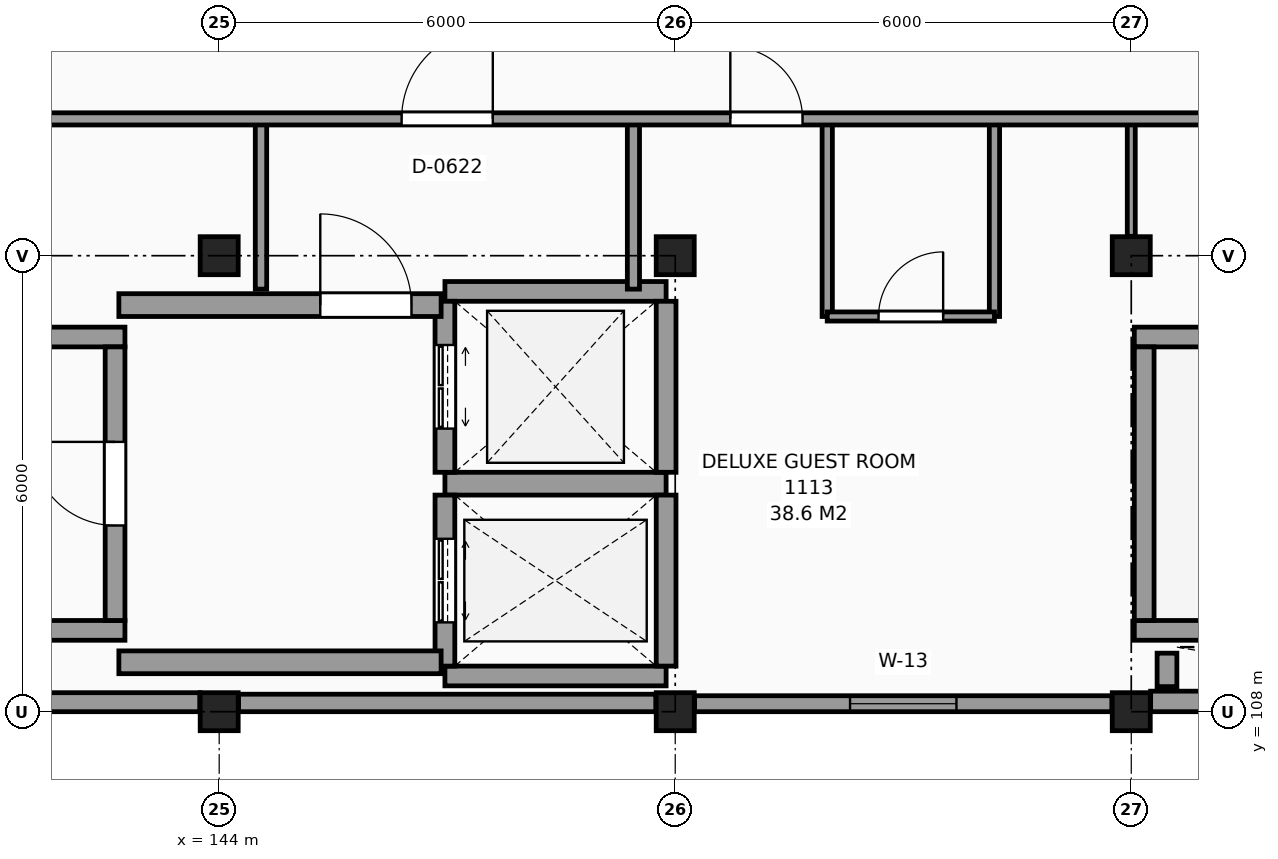
"""IFC4 building model, lengths in metres.
Left out: names, types, materials, properties, quantities, classifications, styles, units other than length and angle.
Written with IfcOpenShell. Run it as: python <this file> out.ifc"""

import sys

from ifc_helpers import new_model, si_unit, direction, frame, frame_2d, origin, origin_2d, place, context, subcontext, project, spatial, rectangle, extrude, element, fill, save


model = new_model("IFC4")
c1 = context("Model", 3, precision=1e-05, world=origin(), true_north=direction((0.0, 1.0)))
c2 = subcontext(c1, "Body", "Model", "MODEL_VIEW")
j1 = project(units=[si_unit("LENGTHUNIT", "METRE"), si_unit("PLANEANGLEUNIT", "RADIAN")], contexts=[c1])
p1 = place(None, origin())
s1 = spatial("IfcSite", under=j1, at=p1, CompositionType="ELEMENT")
p2 = place(p1, origin())
s2 = spatial("IfcBuilding", under=s1, at=p2, CompositionType="ELEMENT")
p3 = place(p2, frame((0.0, 0.0, 44.7)))
s3 = spatial("IfcBuildingStorey", under=s2, at=p3, CompositionType="ELEMENT", Elevation=44.7)
for number, where, z_axis, x_axis in (
    (1, (144.0, 108.0, 0.0), (0.0, 0.0, 1.0), (1.0, 0.0, 0.0)),
    (2, (144.0, 114.0, 0.0), (0.0, 0.0, 1.0), (1.0, 0.0, 0.0)),
    (3, (150.0, 108.0, 0.0), (0.0, 0.0, 1.0), (1.0, 0.0, 0.0)),
    (4, (150.0, 114.0, 0.0), (0.0, 0.0, 1.0), (1.0, 0.0, 0.0)),
    (5, (156.0, 108.0, 0.0), (0.0, 0.0, 1.0), (1.0, 0.0, 0.0)),
    (6, (156.0, 114.0, 0.0), (0.0, 0.0, 1.0), (1.0, 0.0, 0.0)),
):
    element("IfcColumn", number, at=place(p3, frame(where, z_axis=z_axis, x_axis=x_axis)), inside=s3, PredefinedType="COLUMN", context=c2, shape_type="SweptSolid", body=[
        extrude(rectangle(XDim=0.5, YDim=0.5, at=origin_2d()), origin(), (0.0, 0.0, 1.0), 3.3),
    ])
p4 = place(p3, frame((138.255, 108.125, 0.0), z_axis=(0.0, 0.0, 1.0), x_axis=(1.0, 0.0, 0.0)))
e7 = element("IfcWall", 7, at=p4, inside=s3, PredefinedType="SOLIDWALL", context=c2, shape_type="SweptSolid", body=[
    extrude(rectangle(XDim=5.49, YDim=0.25, at=frame_2d((2.745, 0.0))), origin(), (0.0, 0.0, 1.0), 2.4),
])
p5 = place(p3, frame((144.255, 108.115, 0.0), z_axis=(0.0, 0.0, 1.0), x_axis=(1.0, 0.0, 0.0)))
e8 = element("IfcWall", 8, at=p5, inside=s3, PredefinedType="SOLIDWALL", context=c2, shape_type="SweptSolid", body=[
    extrude(rectangle(XDim=5.49, YDim=0.23, at=frame_2d((2.745, 0.0))), origin(), (0.0, 0.0, 1.0), 2.4),
])
p6 = place(p3, frame((150.255, 108.105, 0.0), z_axis=(0.0, 0.0, 1.0), x_axis=(1.0, 0.0, 0.0)))
e9 = element("IfcWall", 9, at=p6, inside=s3, PredefinedType="SOLIDWALL", context=c2, shape_type="SweptSolid", body=[
    extrude(rectangle(XDim=5.49, YDim=0.21, at=frame_2d((2.745, 0.0))), origin(), (0.0, 0.0, 1.0), 2.4),
])
p7 = place(p6, frame((2.045, 0.0, 0.8)))
e10 = element("IfcOpeningElement", 10, at=p7, cuts=e9, PredefinedType="OPENING", context=c2, shape_type="SweptSolid", body=[
    extrude(rectangle(XDim=1.4, YDim=1.4, at=frame_2d((0.7, 0.7))), frame((0.0, 0.115, 0.0), z_axis=(0.0, -1.0, 0.0), x_axis=(1.0, 0.0, 0.0)), (0.0, 0.0, 1.0), 0.23),
])
p8 = place(p3, frame((156.255, 108.135, 0.0), z_axis=(0.0, 0.0, 1.0), x_axis=(1.0, 0.0, 0.0)))
e11 = element("IfcWall", 11, at=p8, inside=s3, PredefinedType="SOLIDWALL", context=c2, shape_type="SweptSolid", body=[
    extrude(rectangle(XDim=5.49, YDim=0.27, at=frame_2d((2.745, 0.0))), origin(), (0.0, 0.0, 1.0), 3.05),
])
for number, where, z_axis, x_axis in (
    (12, (156.04, 109.07, 0.0), (0.0, 0.0, 1.0), (1.0, 0.0, 0.0)),
    (13, (156.04, 112.93, 0.0), (0.0, 0.0, 1.0), (1.0, 0.0, 0.0)),
):
    element("IfcWall", number, at=place(p3, frame(where, z_axis=z_axis, x_axis=x_axis)), inside=s3, PredefinedType="SHEAR", context=c2, shape_type="SweptSolid", body=[
        extrude(rectangle(XDim=10.72, YDim=0.26, at=frame_2d((5.36, 0.0))), origin(), (0.0, 0.0, 1.0), 3.3),
    ])
p9 = place(p3, frame((156.17, 109.2, 0.0), z_axis=(0.0, 0.0, 1.0), x_axis=(0.0, 1.0, 0.0)))
e14 = element("IfcWall", 14, at=p9, inside=s3, PredefinedType="SHEAR", context=c2, shape_type="SweptSolid", body=[
    extrude(rectangle(XDim=3.6, YDim=0.26, at=frame_2d((1.8, 0.0))), origin(), (0.0, 0.0, 1.0), 3.3),
])
p10 = place(p3, frame((156.47, 108.33, 0.0), z_axis=(0.0, 0.0, 1.0), x_axis=(0.0, 1.0, 0.0)))
e15 = element("IfcWall", 15, at=p10, inside=s3, PredefinedType="SHEAR", context=c2, shape_type="SweptSolid", body=[
    extrude(rectangle(XDim=0.44, YDim=0.26, at=frame_2d((0.22, 0.0))), origin(), (0.0, 0.0, 1.0), 3.3),
])
for number, where, z_axis, x_axis in (
    (16, (132.04, 109.07, 0.0), (0.0, 0.0, 1.0), (1.0, 0.0, 0.0)),
    (17, (132.04, 112.93, 0.0), (0.0, 0.0, 1.0), (1.0, 0.0, 0.0)),
):
    element("IfcWall", number, at=place(p3, frame(where, z_axis=z_axis, x_axis=x_axis)), inside=s3, PredefinedType="SHEAR", context=c2, shape_type="SweptSolid", body=[
        extrude(rectangle(XDim=10.72, YDim=0.26, at=frame_2d((5.36, 0.0))), origin(), (0.0, 0.0, 1.0), 3.3),
    ])
p11 = place(p3, frame((142.63, 109.2, 0.0), z_axis=(0.0, 0.0, 1.0), x_axis=(0.0, 1.0, 0.0)))
e18 = element("IfcWall", 18, at=p11, inside=s3, PredefinedType="SHEAR", context=c2, shape_type="SweptSolid", body=[
    extrude(rectangle(XDim=3.6, YDim=0.26, at=frame_2d((1.8, 0.0))), origin(), (0.0, 0.0, 1.0), 3.3),
])
p12 = place(p11, frame((1.25, 0.0, 0.0)))
e19 = element("IfcOpeningElement", 19, at=p12, cuts=e18, PredefinedType="OPENING", context=c2, shape_type="SweptSolid", body=[
    extrude(rectangle(XDim=1.1, YDim=2.15, at=frame_2d((0.55, 1.075))), frame((0.0, 0.14, 0.0), z_axis=(0.0, -1.0, 0.0), x_axis=(1.0, 0.0, 0.0)), (0.0, 0.0, 1.0), 0.28),
])
p13 = place(p3, frame((146.97, 108.47, 0.0), z_axis=(0.0, 0.0, 1.0), x_axis=(1.0, 0.0, 0.0)))
e20 = element("IfcWall", 20, at=p13, inside=s3, PredefinedType="SHEAR", context=c2, shape_type="SweptSolid", body=[
    extrude(rectangle(XDim=2.91, YDim=0.26, at=frame_2d((1.455, 0.0))), origin(), (0.0, 0.0, 1.0), 3.3),
])
p14 = place(p3, frame((146.97, 111.0, 0.0), z_axis=(0.0, 0.0, 1.0), x_axis=(1.0, 0.0, 0.0)))
e21 = element("IfcWall", 21, at=p14, inside=s3, PredefinedType="SHEAR", context=c2, shape_type="SweptSolid", body=[
    extrude(rectangle(XDim=2.91, YDim=0.3, at=frame_2d((1.455, 0.0))), origin(), (0.0, 0.0, 1.0), 3.3),
])
p15 = place(p3, frame((149.88, 108.6, 0.0), z_axis=(0.0, 0.0, 1.0), x_axis=(0.0, 1.0, 0.0)))
e22 = element("IfcWall", 22, at=p15, inside=s3, PredefinedType="SHEAR", context=c2, shape_type="SweptSolid", body=[
    extrude(rectangle(XDim=2.25, YDim=0.26, at=frame_2d((1.125, 0.0))), origin(), (0.0, 0.0, 1.0), 3.3),
])
p16 = place(p3, frame((146.97, 108.6, 0.0), z_axis=(0.0, 0.0, 1.0), x_axis=(0.0, 1.0, 0.0)))
e23 = element("IfcWall", 23, at=p16, inside=s3, PredefinedType="SHEAR", context=c2, shape_type="SweptSolid", body=[
    extrude(rectangle(XDim=2.25, YDim=0.26, at=frame_2d((1.125, 0.0))), origin(), (0.0, 0.0, 1.0), 3.3),
])
p17 = place(p16, frame((0.575, 0.0, 0.0)))
e24 = element("IfcOpeningElement", 24, at=p17, cuts=e23, PredefinedType="OPENING", context=c2, shape_type="SweptSolid", body=[
    extrude(rectangle(XDim=1.1, YDim=2.2, at=frame_2d((0.55, 1.1))), frame((0.0, 0.14, 0.0), z_axis=(0.0, -1.0, 0.0), x_axis=(1.0, 0.0, 0.0)), (0.0, 0.0, 1.0), 0.28),
])
p18 = place(p3, frame((146.97, 113.53, 0.0), z_axis=(0.0, 0.0, 1.0), x_axis=(1.0, 0.0, 0.0)))
e25 = element("IfcWall", 25, at=p18, inside=s3, PredefinedType="SHEAR", context=c2, shape_type="SweptSolid", body=[
    extrude(rectangle(XDim=2.91, YDim=0.26, at=frame_2d((1.455, 0.0))), origin(), (0.0, 0.0, 1.0), 3.3),
])
p19 = place(p3, frame((149.88, 111.15, 0.0), z_axis=(0.0, 0.0, 1.0), x_axis=(0.0, 1.0, 0.0)))
e26 = element("IfcWall", 26, at=p19, inside=s3, PredefinedType="SHEAR", context=c2, shape_type="SweptSolid", body=[
    extrude(rectangle(XDim=2.25, YDim=0.26, at=frame_2d((1.125, 0.0))), origin(), (0.0, 0.0, 1.0), 3.3),
])
p20 = place(p3, frame((146.97, 111.15, 0.0), z_axis=(0.0, 0.0, 1.0), x_axis=(0.0, 1.0, 0.0)))
e27 = element("IfcWall", 27, at=p20, inside=s3, PredefinedType="SHEAR", context=c2, shape_type="SweptSolid", body=[
    extrude(rectangle(XDim=2.25, YDim=0.26, at=frame_2d((1.125, 0.0))), origin(), (0.0, 0.0, 1.0), 3.3),
])
p21 = place(p20, frame((0.575, 0.0, 0.0)))
e28 = element("IfcOpeningElement", 28, at=p21, cuts=e27, PredefinedType="OPENING", context=c2, shape_type="SweptSolid", body=[
    extrude(rectangle(XDim=1.1, YDim=2.2, at=frame_2d((0.55, 1.1))), frame((0.0, 0.14, 0.0), z_axis=(0.0, -1.0, 0.0), x_axis=(1.0, 0.0, 0.0)), (0.0, 0.0, 1.0), 0.28),
])
p22 = place(p3, frame((142.68, 113.35, 0.0), z_axis=(0.0, 0.0, 1.0), x_axis=(1.0, 0.0, 0.0)))
e29 = element("IfcWall", 29, at=p22, inside=s3, PredefinedType="SHEAR", context=c2, shape_type="SweptSolid", body=[
    extrude(rectangle(XDim=4.24, YDim=0.3, at=frame_2d((2.12, 0.0))), origin(), (0.0, 0.0, 1.0), 3.3),
])
p23 = place(p22, frame((2.65, 0.0, 0.0)))
e30 = element("IfcOpeningElement", 30, at=p23, cuts=e29, PredefinedType="OPENING", context=c2, shape_type="SweptSolid", body=[
    extrude(rectangle(XDim=1.2, YDim=2.2, at=frame_2d((0.6, 1.1))), frame((0.0, 0.16, 0.0), z_axis=(0.0, -1.0, 0.0), x_axis=(1.0, 0.0, 0.0)), (0.0, 0.0, 1.0), 0.32),
])
p24 = place(p3, frame((142.68, 108.65, 0.0), z_axis=(0.0, 0.0, 1.0), x_axis=(1.0, 0.0, 0.0)))
e31 = element("IfcWall", 31, at=p24, inside=s3, PredefinedType="SHEAR", context=c2, shape_type="SweptSolid", body=[
    extrude(rectangle(XDim=4.24, YDim=0.3, at=frame_2d((2.12, 0.0))), origin(), (0.0, 0.0, 1.0), 3.3),
])
p25 = place(p3, frame((144.55, 113.56, 0.0), z_axis=(0.0, 0.0, 1.0), x_axis=(0.0, 1.0, 0.0)))
e32 = element("IfcWall", 32, at=p25, inside=s3, PredefinedType="PARTITIONING", context=c2, shape_type="SweptSolid", body=[
    extrude(rectangle(XDim=2.24, YDim=0.15, at=frame_2d((1.12, 0.0))), origin(), (0.0, 0.0, 1.0), 3.05),
])
p26 = place(p3, frame((149.45, 113.56, 0.0), z_axis=(0.0, 0.0, 1.0), x_axis=(0.0, 1.0, 0.0)))
e33 = element("IfcWall", 33, at=p26, inside=s3, PredefinedType="PARTITIONING", context=c2, shape_type="SweptSolid", body=[
    extrude(rectangle(XDim=2.24, YDim=0.16, at=frame_2d((1.12, 0.0))), origin(), (0.0, 0.0, 1.0), 3.05),
])
for number, where, z_axis, x_axis in (
    (34, (152.0, 113.2, 0.0), (0.0, 0.0, 1.0), (0.0, 1.0, 0.0)),
    (35, (154.2, 113.2, 0.0), (0.0, 0.0, 1.0), (0.0, 1.0, 0.0)),
):
    element("IfcWall", number, at=place(p3, frame(where, z_axis=z_axis, x_axis=x_axis)), inside=s3, PredefinedType="PARTITIONING", context=c2, shape_type="SweptSolid", body=[
        extrude(rectangle(XDim=2.6, YDim=0.135, at=frame_2d((1.3, 0.0))), origin(), (0.0, 0.0, 1.0), 3.05),
    ])
p27 = place(p3, frame((156.0, 114.255, 0.0), z_axis=(0.0, 0.0, 1.0), x_axis=(0.0, 1.0, 0.0)))
e36 = element("IfcWall", 36, at=p27, inside=s3, PredefinedType="PARTITIONING", context=c2, shape_type="SweptSolid", body=[
    extrude(rectangle(XDim=1.545, YDim=0.105, at=frame_2d((0.772, 0.0))), origin(), (0.0, 0.0, 1.0), 2.35),
])
p28 = place(p3, frame((152.0, 113.2, 0.0), z_axis=(0.0, 0.0, 1.0), x_axis=(1.0, 0.0, 0.0)))
e37 = element("IfcWall", 37, at=p28, inside=s3, PredefinedType="PARTITIONING", context=c2, shape_type="SweptSolid", body=[
    extrude(rectangle(XDim=2.2, YDim=0.12, at=frame_2d((1.1, 0.0))), origin(), (0.0, 0.0, 1.0), 3.05),
])
p29 = place(p28, frame((0.675, 0.0, 0.0)))
e38 = element("IfcOpeningElement", 38, at=p29, cuts=e37, PredefinedType="OPENING", context=c2, shape_type="SweptSolid", body=[
    extrude(rectangle(XDim=0.85, YDim=2.1, at=frame_2d((0.425, 1.05))), frame((0.0, 0.07, 0.0), z_axis=(0.0, -1.0, 0.0), x_axis=(1.0, 0.0, 0.0)), (0.0, 0.0, 1.0), 0.14),
])
p30 = place(p3, frame((102.255, 115.8, 0.0), z_axis=(0.0, 0.0, 1.0), x_axis=(1.0, 0.0, 0.0)))
e39 = element("IfcWall", 39, at=p30, inside=s3, PredefinedType="PARTITIONING", context=c2, shape_type="SweptSolid", body=[
    extrude(rectangle(XDim=67.545, YDim=0.16, at=frame_2d((33.772, 0.0))), origin(), (0.0, 0.0, 1.0), 3.05),
])
p31 = place(p30, frame((44.145, 0.0, 0.0)))
e40 = element("IfcOpeningElement", 40, at=p31, cuts=e39, PredefinedType="OPENING", context=c2, shape_type="SweptSolid", body=[
    extrude(rectangle(XDim=1.2, YDim=2.2, at=frame_2d((0.6, 1.1))), frame((0.0, 0.09, 0.0), z_axis=(0.0, -1.0, 0.0), x_axis=(1.0, 0.0, 0.0)), (0.0, 0.0, 1.0), 0.18),
])
p32 = place(p30, frame((14.145, 0.0, 0.0)))
e41 = element("IfcOpeningElement", 41, at=p32, cuts=e39, PredefinedType="OPENING", context=c2, shape_type="SweptSolid", body=[
    extrude(rectangle(XDim=1.2, YDim=2.2, at=frame_2d((0.6, 1.1))), frame((0.0, 0.09, 0.0), z_axis=(0.0, -1.0, 0.0), x_axis=(1.0, 0.0, 0.0)), (0.0, 0.0, 1.0), 0.18),
])
p33 = place(p30, frame((19.295, 0.0, 0.0)))
e42 = element("IfcOpeningElement", 42, at=p33, cuts=e39, PredefinedType="OPENING", context=c2, shape_type="SweptSolid", body=[
    extrude(rectangle(XDim=1.0, YDim=2.15, at=frame_2d((0.5, 1.075))), frame((0.0, 0.09, 0.0), z_axis=(0.0, -1.0, 0.0), x_axis=(1.0, 0.0, 0.0)), (0.0, 0.0, 1.0), 0.18),
])
p34 = place(p30, frame((26.265, 0.0, 0.0)))
e43 = element("IfcOpeningElement", 43, at=p34, cuts=e39, PredefinedType="OPENING", context=c2, shape_type="SweptSolid", body=[
    extrude(rectangle(XDim=0.96, YDim=2.15, at=frame_2d((0.48, 1.075))), frame((0.0, 0.09, 0.0), z_axis=(0.0, -1.0, 0.0), x_axis=(1.0, 0.0, 0.0)), (0.0, 0.0, 1.0), 0.18),
])
p35 = place(p30, frame((48.47, 0.0, 0.0)))
e44 = element("IfcOpeningElement", 44, at=p35, cuts=e39, PredefinedType="OPENING", context=c2, shape_type="SweptSolid", body=[
    extrude(rectangle(XDim=0.95, YDim=2.1, at=frame_2d((0.475, 1.05))), frame((0.0, 0.09, 0.0), z_axis=(0.0, -1.0, 0.0), x_axis=(1.0, 0.0, 0.0)), (0.0, 0.0, 1.0), 0.18),
])
p36 = place(p7, origin())
e45 = element("IfcWindow", 45, at=p36, inside=s3, PartitioningType="SINGLE_PANEL", PredefinedType="WINDOW", context=c2, shape_type="SweptSolid", body=[
    extrude(rectangle(XDim=1.4, YDim=1.4, at=frame_2d((0.7, 0.7))), frame((0.0, 0.03, 0.0), z_axis=(0.0, -1.0, 0.0), x_axis=(1.0, 0.0, 0.0)), (0.0, 0.0, 1.0), 0.06),
])
fill(e10, e45)
p37 = place(p12, origin())
e46 = element("IfcDoor", 46, at=p37, inside=s3, OperationType="SINGLE_SWING_RIGHT", PredefinedType="DOOR", context=c2, shape_type="SweptSolid", body=[
    extrude(rectangle(XDim=1.1, YDim=2.15, at=frame_2d((0.55, 1.075))), frame((0.0, 0.025, 0.0), z_axis=(0.0, -1.0, 0.0), x_axis=(1.0, 0.0, 0.0)), (0.0, 0.0, 1.0), 0.05),
])
fill(e19, e46)
p38 = place(p17, origin())
e47 = element("IfcDoor", 47, at=p38, inside=s3, OperationType="DOUBLE_DOOR_SLIDING", PredefinedType="DOOR", context=c2, shape_type="SweptSolid", body=[
    extrude(rectangle(XDim=1.1, YDim=2.2, at=frame_2d((0.55, 1.1))), frame((0.0, 0.025, 0.0), z_axis=(0.0, -1.0, 0.0), x_axis=(1.0, 0.0, 0.0)), (0.0, 0.0, 1.0), 0.05),
])
fill(e24, e47)
p39 = place(p21, origin())
e48 = element("IfcDoor", 48, at=p39, inside=s3, OperationType="DOUBLE_DOOR_SLIDING", PredefinedType="DOOR", context=c2, shape_type="SweptSolid", body=[
    extrude(rectangle(XDim=1.1, YDim=2.2, at=frame_2d((0.55, 1.1))), frame((0.0, 0.025, 0.0), z_axis=(0.0, -1.0, 0.0), x_axis=(1.0, 0.0, 0.0)), (0.0, 0.0, 1.0), 0.05),
])
fill(e28, e48)
p40 = place(p23, origin())
e49 = element("IfcDoor", 49, at=p40, inside=s3, OperationType="SINGLE_SWING_LEFT", PredefinedType="DOOR", context=c2, shape_type="SweptSolid", body=[
    extrude(rectangle(XDim=1.2, YDim=2.2, at=frame_2d((0.6, 1.1))), frame((0.0, 0.025, 0.0), z_axis=(0.0, -1.0, 0.0), x_axis=(1.0, 0.0, 0.0)), (0.0, 0.0, 1.0), 0.05),
])
fill(e30, e49)
p41 = place(p31, origin())
e50 = element("IfcDoor", 50, at=p41, inside=s3, OperationType="SINGLE_SWING_RIGHT", PredefinedType="DOOR", context=c2, shape_type="SweptSolid", body=[
    extrude(rectangle(XDim=1.2, YDim=2.2, at=frame_2d((0.6, 1.1))), frame((0.0, 0.025, 0.0), z_axis=(0.0, -1.0, 0.0), x_axis=(1.0, 0.0, 0.0)), (0.0, 0.0, 1.0), 0.05),
])
fill(e40, e50)
p42 = place(p29, origin())
e51 = element("IfcDoor", 51, at=p42, inside=s3, OperationType="SINGLE_SWING_RIGHT", PredefinedType="DOOR", context=c2, shape_type="SweptSolid", body=[
    extrude(rectangle(XDim=0.85, YDim=2.1, at=frame_2d((0.425, 1.05))), frame((0.0, 0.025, 0.0), z_axis=(0.0, -1.0, 0.0), x_axis=(1.0, 0.0, 0.0)), (0.0, 0.0, 1.0), 0.05),
])
fill(e38, e51)
p43 = place(p35, origin())
e52 = element("IfcDoor", 52, at=p43, inside=s3, OperationType="SINGLE_SWING_LEFT", PredefinedType="DOOR", context=c2, shape_type="SweptSolid", body=[
    extrude(rectangle(XDim=0.95, YDim=2.1, at=frame_2d((0.475, 1.05))), frame((0.0, 0.025, 0.0), z_axis=(0.0, -1.0, 0.0), x_axis=(1.0, 0.0, 0.0)), (0.0, 0.0, 1.0), 0.05),
])
fill(e44, e52)
save(model, sys.argv[1])
